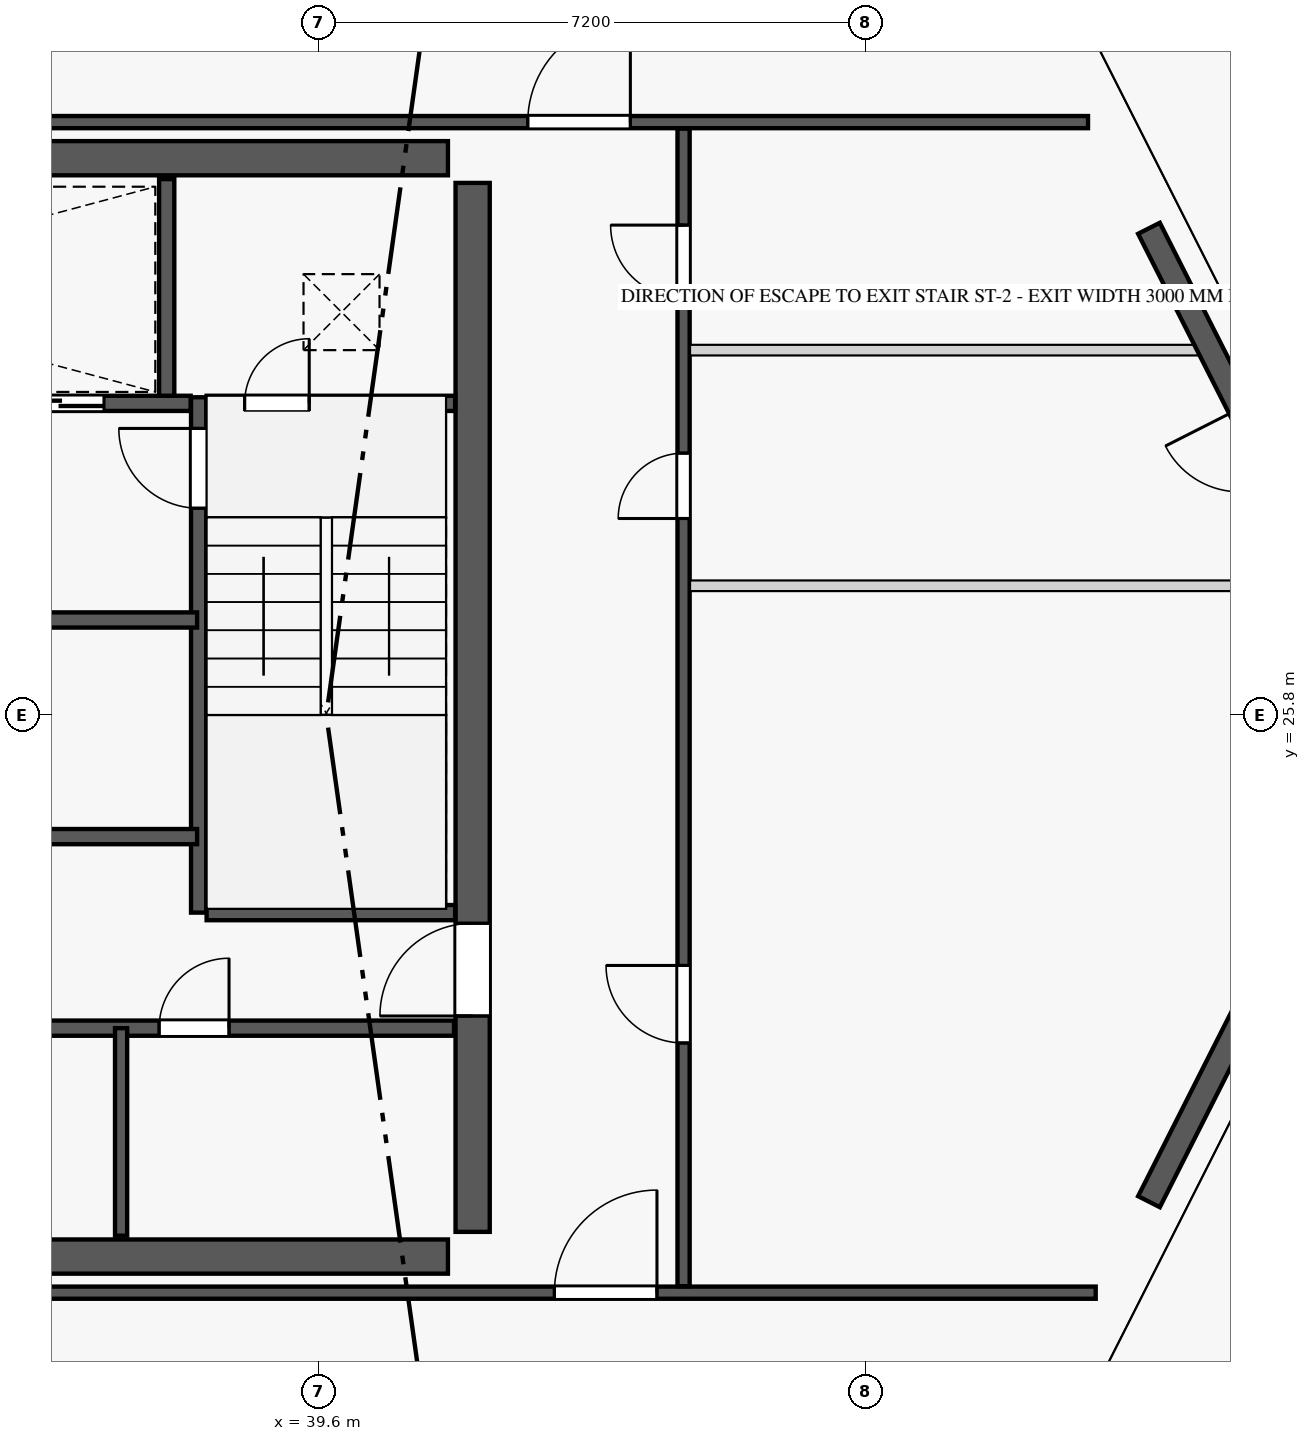
"""IFC4 building model, lengths in metres.
Left out: names, types, materials, properties, quantities, classifications, styles, units other than length and angle.
Written with IfcOpenShell. Run it as: python <this file> out.ifc"""

import sys

from ifc_helpers import new_model, si_unit, direction, frame, frame_2d, origin, origin_2d, place, context, subcontext, project, spatial, rectangle, extrude, element, fill, save


model = new_model("IFC4")
c1 = context("Model", 3, precision=1e-05, world=origin(), true_north=direction((0.0, 1.0)))
c2 = subcontext(c1, "Body", "Model", "MODEL_VIEW")
j1 = project(units=[si_unit("LENGTHUNIT", "METRE"), si_unit("PLANEANGLEUNIT", "RADIAN")], contexts=[c1])
p1 = place(None, origin())
s1 = spatial("IfcSite", under=j1, at=p1, CompositionType="ELEMENT")
p2 = place(p1, origin())
s2 = spatial("IfcBuilding", under=s1, at=p2, CompositionType="ELEMENT")
p3 = place(p2, frame((0.0, 0.0, 278.1)))
s3 = spatial("IfcBuildingStorey", under=s2, at=p3, CompositionType="ELEMENT", Elevation=278.1)
for number, where, z_axis, x_axis in (
    (1, (41.625, 18.675, 0.0), (0.0, 0.0, 1.0), (1.0, 0.0, 0.0)),
    (2, (41.625, 33.125, 0.0), (0.0, 0.0, 1.0), (1.0, 0.0, 0.0)),
):
    element("IfcColumn", number, at=place(p3, frame(where, z_axis=z_axis, x_axis=x_axis)), inside=s3, PredefinedType="COLUMN", context=c2, shape_type="SweptSolid", body=[
        extrude(rectangle(XDim=0.65, YDim=0.65, at=origin_2d()), origin(), (0.0, 0.0, 1.0), 5.4),
    ])
for number, where, z_axis, x_axis in (
    (3, (23.5, 18.675, 0.0), (0.0, 0.0, 1.0), (1.0, 0.0, 0.0)),
    (4, (23.5, 33.125, 0.0), (0.0, 0.0, 1.0), (1.0, 0.0, 0.0)),
):
    element("IfcWall", number, at=place(p3, frame(where, z_axis=z_axis, x_axis=x_axis)), inside=s3, PredefinedType="SHEAR", context=c2, shape_type="SweptSolid", body=[
        extrude(rectangle(XDim=17.8, YDim=0.45, at=frame_2d((8.9, 0.0))), origin(), (0.0, 0.0, 1.0), 5.2),
    ])
p4 = place(p3, frame((41.625, 19.0, 0.0), z_axis=(0.0, 0.0, 1.0), x_axis=(0.0, 1.0, 0.0)))
e5 = element("IfcWall", 5, at=p4, inside=s3, PredefinedType="SHEAR", context=c2, shape_type="SweptSolid", body=[
    extrude(rectangle(XDim=13.8, YDim=0.45, at=frame_2d((6.9, 0.0))), origin(), (0.0, 0.0, 1.0), 5.2),
])
p5 = place(p4, frame((2.84, 0.0, 0.0)))
e6 = element("IfcOpeningElement", 6, at=p5, cuts=e5, PredefinedType="OPENING", context=c2, shape_type="SweptSolid", body=[
    extrude(rectangle(XDim=1.22, YDim=2.25, at=frame_2d((0.61, 1.125))), frame((0.0, 0.235, 0.0), z_axis=(0.0, -1.0, 0.0), x_axis=(1.0, 0.0, 0.0)), (0.0, 0.0, 1.0), 0.47),
])
for number, where, z_axis, x_axis in (
    (7, (50.264, 19.033, 0.0), (0.0, 0.0, 1.0), (1.0, 0.0, 0.0)),
    (8, (50.264, 32.567, 0.0), (0.0, 0.0, 1.0), (1.0, 0.0, 0.0)),
):
    element("IfcColumn", number, at=place(p3, frame(where, z_axis=z_axis, x_axis=x_axis)), inside=s3, PredefinedType="COLUMN", context=c2, shape_type="SweptSolid", body=[
        extrude(rectangle(XDim=0.65, YDim=0.65, at=origin_2d()), origin(), (0.0, 0.0, 1.0), 5.4),
    ])
p6 = place(p3, frame((38.02, 23.2, 0.0), z_axis=(0.0, 0.0, 1.0), x_axis=(0.0, 1.0, 0.0)))
e9 = element("IfcWall", 9, at=p6, inside=s3, PredefinedType="SHEAR", context=c2, shape_type="SweptSolid", body=[
    extrude(rectangle(XDim=6.78, YDim=0.2, at=frame_2d((3.39, 0.0))), origin(), (0.0, 0.0, 1.0), 5.4),
])
p7 = place(p6, frame((5.32, 0.0, 0.0)))
e10 = element("IfcOpeningElement", 10, at=p7, cuts=e9, PredefinedType="OPENING", context=c2, shape_type="SweptSolid", body=[
    extrude(rectangle(XDim=1.05, YDim=2.15, at=frame_2d((0.525, 1.075))), frame((0.0, 0.11, 0.0), z_axis=(0.0, -1.0, 0.0), x_axis=(1.0, 0.0, 0.0)), (0.0, 0.0, 1.0), 0.22),
])
p8 = place(p3, frame((38.125, 23.2, 0.0), z_axis=(0.0, 0.0, 1.0), x_axis=(1.0, 0.0, 0.0)))
e11 = element("IfcWall", 11, at=p8, inside=s3, PredefinedType="PLUMBINGWALL", context=c2, shape_type="SweptSolid", body=[
    extrude(rectangle(XDim=3.27, YDim=0.2, at=frame_2d((1.635, 0.0))), origin(), (0.0, 0.0, 1.0), 5.2),
])
p9 = place(p3, frame((34.9, 29.9, 0.0), z_axis=(0.0, 0.0, 1.0), x_axis=(1.0, 0.0, 0.0)))
e12 = element("IfcWall", 12, at=p9, inside=s3, PredefinedType="PLUMBINGWALL", context=c2, shape_type="SweptSolid", body=[
    extrude(rectangle(XDim=3.015, YDim=0.2, at=frame_2d((1.508, 0.0))), origin(), (0.0, 0.0, 1.0), 5.2),
])
p10 = place(p9, frame((0.725, 0.0, 0.0)))
e13 = element("IfcOpeningElement", 13, at=p10, cuts=e12, PredefinedType="OPENING", context=c2, shape_type="SweptSolid", body=[
    extrude(rectangle(XDim=1.15, YDim=2.2, at=frame_2d((0.575, 1.1))), frame((0.0, 0.11, 0.0), z_axis=(0.0, -1.0, 0.0), x_axis=(1.0, 0.0, 0.0)), (0.0, 0.0, 1.0), 0.22),
])
p11 = place(p3, frame((38.125, 29.9, 0.0), z_axis=(0.0, 0.0, 1.0), x_axis=(1.0, 0.0, 0.0)))
e14 = element("IfcWall", 14, at=p11, inside=s3, PredefinedType="PLUMBINGWALL", context=c2, shape_type="SweptSolid", body=[
    extrude(rectangle(XDim=3.27, YDim=0.2, at=frame_2d((1.635, 0.0))), origin(), (0.0, 0.0, 1.0), 5.2),
])
p12 = place(p11, frame((0.5, 0.0, 0.0)))
e15 = element("IfcOpeningElement", 15, at=p12, cuts=e14, PredefinedType="OPENING", context=c2, shape_type="SweptSolid", body=[
    extrude(rectangle(XDim=0.85, YDim=2.05, at=frame_2d((0.425, 1.025))), frame((0.0, 0.11, 0.0), z_axis=(0.0, -1.0, 0.0), x_axis=(1.0, 0.0, 0.0)), (0.0, 0.0, 1.0), 0.22),
])
p13 = place(p3, frame((37.6, 30.0, 0.0), z_axis=(0.0, 0.0, 1.0), x_axis=(0.0, 1.0, 0.0)))
e16 = element("IfcWall", 16, at=p13, inside=s3, PredefinedType="PLUMBINGWALL", context=c2, shape_type="SweptSolid", body=[
    extrude(rectangle(XDim=2.85, YDim=0.2, at=frame_2d((1.425, 0.0))), origin(), (0.0, 0.0, 1.0), 5.2),
])
p14 = place(p3, frame((34.8, 27.05, 0.0), z_axis=(0.0, 0.0, 1.0), x_axis=(1.0, 0.0, 0.0)))
e17 = element("IfcWall", 17, at=p14, inside=s3, PredefinedType="PLUMBINGWALL", context=c2, shape_type="SweptSolid", body=[
    extrude(rectangle(XDim=3.2, YDim=0.2, at=frame_2d((1.6, 0.0))), origin(), (0.0, 0.0, 1.0), 5.2),
])
p15 = place(p3, frame((31.2, 24.2, 0.0), z_axis=(0.0, 0.0, 1.0), x_axis=(1.0, 0.0, 0.0)))
e18 = element("IfcWall", 18, at=p15, inside=s3, PredefinedType="PLUMBINGWALL", context=c2, shape_type="SweptSolid", body=[
    extrude(rectangle(XDim=6.8, YDim=0.2, at=frame_2d((3.4, 0.0))), origin(), (0.0, 0.0, 1.0), 5.2),
])
p16 = place(p15, frame((0.65, 0.0, 0.0)))
e19 = element("IfcOpeningElement", 19, at=p16, cuts=e18, PredefinedType="OPENING", context=c2, shape_type="SweptSolid", body=[
    extrude(rectangle(XDim=1.1, YDim=2.2, at=frame_2d((0.55, 1.1))), frame((0.0, 0.11, 0.0), z_axis=(0.0, -1.0, 0.0), x_axis=(1.0, 0.0, 0.0)), (0.0, 0.0, 1.0), 0.22),
])
p17 = place(p15, frame((3.8, 0.0, 0.0)))
e20 = element("IfcOpeningElement", 20, at=p17, cuts=e18, PredefinedType="OPENING", context=c2, shape_type="SweptSolid", body=[
    extrude(rectangle(XDim=0.92, YDim=2.15, at=frame_2d((0.46, 1.075))), frame((0.0, 0.11, 0.0), z_axis=(0.0, -1.0, 0.0), x_axis=(1.0, 0.0, 0.0)), (0.0, 0.0, 1.0), 0.22),
])
p18 = place(p3, frame((23.42, 21.68, 0.0), z_axis=(0.0, 0.0, 1.0), x_axis=(1.0, 0.0, 0.0)))
e21 = element("IfcWall", 21, at=p18, inside=s3, PredefinedType="PLUMBINGWALL", context=c2, shape_type="SweptSolid", body=[
    extrude(rectangle(XDim=17.96, YDim=0.2, at=frame_2d((8.98, 0.0))), origin(), (0.0, 0.0, 1.0), 5.2),
])
p19 = place(p18, frame((0.46, 0.0, 0.0)))
e22 = element("IfcOpeningElement", 22, at=p19, cuts=e21, PredefinedType="OPENING", context=c2, shape_type="SweptSolid", body=[
    extrude(rectangle(XDim=0.92, YDim=2.15, at=frame_2d((0.46, 1.075))), frame((0.0, 0.11, 0.0), z_axis=(0.0, -1.0, 0.0), x_axis=(1.0, 0.0, 0.0)), (0.0, 0.0, 1.0), 0.22),
])
p20 = place(p18, frame((4.78, 0.0, 0.0)))
e23 = element("IfcOpeningElement", 23, at=p20, cuts=e21, PredefinedType="OPENING", context=c2, shape_type="SweptSolid", body=[
    extrude(rectangle(XDim=0.92, YDim=2.15, at=frame_2d((0.46, 1.075))), frame((0.0, 0.11, 0.0), z_axis=(0.0, -1.0, 0.0), x_axis=(1.0, 0.0, 0.0)), (0.0, 0.0, 1.0), 0.22),
])
p21 = place(p18, frame((9.48, 0.0, 0.0)))
e24 = element("IfcOpeningElement", 24, at=p21, cuts=e21, PredefinedType="OPENING", context=c2, shape_type="SweptSolid", body=[
    extrude(rectangle(XDim=0.92, YDim=2.15, at=frame_2d((0.46, 1.075))), frame((0.0, 0.11, 0.0), z_axis=(0.0, -1.0, 0.0), x_axis=(1.0, 0.0, 0.0)), (0.0, 0.0, 1.0), 0.22),
])
p22 = place(p18, frame((14.08, 0.0, 0.0)))
e25 = element("IfcOpeningElement", 25, at=p22, cuts=e21, PredefinedType="OPENING", context=c2, shape_type="SweptSolid", body=[
    extrude(rectangle(XDim=0.92, YDim=2.15, at=frame_2d((0.46, 1.075))), frame((0.0, 0.11, 0.0), z_axis=(0.0, -1.0, 0.0), x_axis=(1.0, 0.0, 0.0)), (0.0, 0.0, 1.0), 0.22),
])
p23 = place(p3, frame((37.0, 18.95, 0.0), z_axis=(0.0, 0.0, 1.0), x_axis=(0.0, 1.0, 0.0)))
e26 = element("IfcWall", 26, at=p23, inside=s3, PredefinedType="PARTITIONING", context=c2, shape_type="SweptSolid", body=[
    extrude(rectangle(XDim=2.73, YDim=0.16, at=frame_2d((1.365, 0.0))), origin(), (0.0, 0.0, 1.0), 5.2),
])
p24 = place(p3, frame((14.978, 18.2, 0.0), z_axis=(0.0, 0.0, 1.0), x_axis=(1.0, 0.0, 0.0)))
e27 = element("IfcWall", 27, at=p24, inside=s3, PredefinedType="PARTITIONING", context=c2, shape_type="SweptSolid", body=[
    extrude(rectangle(XDim=34.844, YDim=0.16, at=frame_2d((17.422, 0.0))), origin(), (0.0, 0.0, 1.0), 5.2),
])
p25 = place(p24, frame((5.972, 0.0, 0.0)))
e28 = element("IfcOpeningElement", 28, at=p25, cuts=e27, PredefinedType="OPENING", context=c2, shape_type="SweptSolid", body=[
    extrude(rectangle(XDim=1.35, YDim=2.35, at=frame_2d((0.675, 1.175))), frame((0.0, 0.09, 0.0), z_axis=(0.0, -1.0, 0.0), x_axis=(1.0, 0.0, 0.0)), (0.0, 0.0, 1.0), 0.18),
])
p26 = place(p24, frame((27.722, 0.0, 0.0)))
e29 = element("IfcOpeningElement", 29, at=p26, cuts=e27, PredefinedType="OPENING", context=c2, shape_type="SweptSolid", body=[
    extrude(rectangle(XDim=1.35, YDim=2.35, at=frame_2d((0.675, 1.175))), frame((0.0, 0.09, 0.0), z_axis=(0.0, -1.0, 0.0), x_axis=(1.0, 0.0, 0.0)), (0.0, 0.0, 1.0), 0.18),
])
p27 = place(p3, frame((44.4, 18.285, 0.0), z_axis=(0.0, 0.0, 1.0), x_axis=(0.0, 1.0, 0.0)))
e30 = element("IfcWall", 30, at=p27, inside=s3, PredefinedType="PARTITIONING", context=c2, shape_type="SweptSolid", body=[
    extrude(rectangle(XDim=15.23, YDim=0.16, at=frame_2d((7.615, 0.0))), origin(), (0.0, 0.0, 1.0), 4.887),
])
p28 = place(p27, frame((3.2, 0.0, 0.0)))
e31 = element("IfcOpeningElement", 31, at=p28, cuts=e30, PredefinedType="OPENING", context=c2, shape_type="SweptSolid", body=[
    extrude(rectangle(XDim=1.02, YDim=2.25, at=frame_2d((0.51, 1.125))), frame((0.0, 0.09, 0.0), z_axis=(0.0, -1.0, 0.0), x_axis=(1.0, 0.0, 0.0)), (0.0, 0.0, 1.0), 0.18),
])
p29 = place(p27, frame((10.1, 0.0, 0.0)))
e32 = element("IfcOpeningElement", 32, at=p29, cuts=e30, PredefinedType="OPENING", context=c2, shape_type="SweptSolid", body=[
    extrude(rectangle(XDim=0.86, YDim=2.1, at=frame_2d((0.43, 1.05))), frame((0.0, 0.09, 0.0), z_axis=(0.0, -1.0, 0.0), x_axis=(1.0, 0.0, 0.0)), (0.0, 0.0, 1.0), 0.18),
])
p30 = place(p27, frame((13.0, 0.0, 0.0)))
e33 = element("IfcOpeningElement", 33, at=p30, cuts=e30, PredefinedType="OPENING", context=c2, shape_type="SweptSolid", body=[
    extrude(rectangle(XDim=0.96, YDim=2.15, at=frame_2d((0.48, 1.075))), frame((0.0, 0.09, 0.0), z_axis=(0.0, -1.0, 0.0), x_axis=(1.0, 0.0, 0.0)), (0.0, 0.0, 1.0), 0.18),
])
p31 = place(p3, frame((15.079, 33.6, 0.0), z_axis=(0.0, 0.0, 1.0), x_axis=(1.0, 0.0, 0.0)))
e34 = element("IfcWall", 34, at=p31, inside=s3, PredefinedType="PARTITIONING", context=c2, shape_type="SweptSolid", body=[
    extrude(rectangle(XDim=34.642, YDim=0.16, at=frame_2d((17.321, 0.0))), origin(), (0.0, 0.0, 1.0), 5.2),
])
p32 = place(p31, frame((5.871, 0.0, 0.0)))
e35 = element("IfcOpeningElement", 35, at=p32, cuts=e34, PredefinedType="OPENING", context=c2, shape_type="SweptSolid", body=[
    extrude(rectangle(XDim=1.35, YDim=2.35, at=frame_2d((0.675, 1.175))), frame((0.0, 0.09, 0.0), z_axis=(0.0, -1.0, 0.0), x_axis=(1.0, 0.0, 0.0)), (0.0, 0.0, 1.0), 0.18),
])
p33 = place(p31, frame((27.271, 0.0, 0.0)))
e36 = element("IfcOpeningElement", 36, at=p33, cuts=e34, PredefinedType="OPENING", context=c2, shape_type="SweptSolid", body=[
    extrude(rectangle(XDim=1.35, YDim=2.35, at=frame_2d((0.675, 1.175))), frame((0.0, 0.09, 0.0), z_axis=(0.0, -1.0, 0.0), x_axis=(1.0, 0.0, 0.0)), (0.0, 0.0, 1.0), 0.18),
])
p34 = place(p3, frame((44.485, 27.5, 0.0), z_axis=(0.0, 0.0, 1.0), x_axis=(1.0, 0.0, 0.0)))
e37 = element("IfcWall", 37, at=p34, inside=s3, PredefinedType="PLUMBINGWALL", context=c2, shape_type="SweptSolid", body=[
    extrude(rectangle(XDim=8.322, YDim=0.14, at=frame_2d((4.161, 0.0))), origin(), (0.0, 0.0, 1.0), 5.2),
])
p35 = place(p3, frame((44.485, 30.6, 0.0), z_axis=(0.0, 0.0, 1.0), x_axis=(1.0, 0.0, 0.0)))
e38 = element("IfcWall", 38, at=p35, inside=s3, PredefinedType="PLUMBINGWALL", context=c2, shape_type="SweptSolid", body=[
    extrude(rectangle(XDim=6.754, YDim=0.14, at=frame_2d((3.377, 0.0))), origin(), (0.0, 0.0, 1.0), 5.2),
])
p36 = place(p3, frame((50.523, 19.397, 0.0), z_axis=(0.0, 0.0, 1.0), x_axis=(0.451535871335, 0.892252966875, 0.0)))
e39 = element("IfcWall", 39, at=p36, inside=s3, PredefinedType="STANDARD", context=c2, shape_type="SweptSolid", body=[
    extrude(rectangle(XDim=4.536, YDim=0.32, at=frame_2d((2.268, 0.0))), origin(), (0.0, 0.0, 1.0), 4.39),
])
p37 = place(p36, frame((1.568, 0.0, 0.75)))
e40 = element("IfcOpeningElement", 40, at=p37, cuts=e39, PredefinedType="OPENING", context=c2, shape_type="SweptSolid", body=[
    extrude(rectangle(XDim=1.4, YDim=2.05, at=frame_2d((0.7, 1.025))), frame((0.0, 0.17, 0.0), z_axis=(0.0, -1.0, 0.0), x_axis=(1.0, 0.0, 0.0)), (0.0, 0.0, 1.0), 0.34),
])
p38 = place(p3, frame((52.571, 28.156, 0.0), z_axis=(0.0, 0.0, 1.0), x_axis=(-0.451557557387, 0.892241992044, 0.0)))
e41 = element("IfcWall", 41, at=p38, inside=s3, PredefinedType="STANDARD", context=c2, shape_type="SweptSolid", body=[
    extrude(rectangle(XDim=4.536, YDim=0.32, at=frame_2d((2.268, 0.0))), origin(), (0.0, 0.0, 1.0), 4.39),
])
p39 = place(p38, frame((0.782, 0.0, 0.0)))
e42 = element("IfcOpeningElement", 42, at=p39, cuts=e41, PredefinedType="OPENING", context=c2, shape_type="SweptSolid", body=[
    extrude(rectangle(XDim=1.1, YDim=2.25, at=frame_2d((0.55, 1.125))), frame((0.0, 0.17, 0.0), z_axis=(0.0, -1.0, 0.0), x_axis=(1.0, 0.0, 0.0)), (0.0, 0.0, 1.0), 0.34),
])
p40 = place(p38, frame((3.173, 0.0, 0.75)))
e43 = element("IfcOpeningElement", 43, at=p40, cuts=e41, PredefinedType="OPENING", context=c2, shape_type="SweptSolid", body=[
    extrude(rectangle(XDim=1.1, YDim=2.0, at=frame_2d((0.55, 1.0))), frame((0.0, 0.17, 0.0), z_axis=(0.0, -1.0, 0.0), x_axis=(1.0, 0.0, 0.0)), (0.0, 0.0, 1.0), 0.34),
])
p41 = place(p5, origin())
e44 = element("IfcDoor", 44, at=p41, inside=s3, OperationType="SINGLE_SWING_LEFT", PredefinedType="DOOR", context=c2, shape_type="SweptSolid", body=[
    extrude(rectangle(XDim=1.22, YDim=2.25, at=frame_2d((0.61, 1.125))), frame((0.0, 0.025, 0.0), z_axis=(0.0, -1.0, 0.0), x_axis=(1.0, 0.0, 0.0)), (0.0, 0.0, 1.0), 0.05),
])
fill(e6, e44)
p42 = place(p7, origin())
e45 = element("IfcDoor", 45, at=p42, inside=s3, OperationType="SINGLE_SWING_RIGHT", PredefinedType="DOOR", context=c2, shape_type="SweptSolid", body=[
    extrude(rectangle(XDim=1.05, YDim=2.15, at=frame_2d((0.525, 1.075))), frame((0.0, 0.025, 0.0), z_axis=(0.0, -1.0, 0.0), x_axis=(1.0, 0.0, 0.0)), (0.0, 0.0, 1.0), 0.05),
])
fill(e10, e45)
p43 = place(p12, origin())
e46 = element("IfcDoor", 46, at=p43, inside=s3, OperationType="SINGLE_SWING_RIGHT", PredefinedType="DOOR", context=c2, shape_type="SweptSolid", body=[
    extrude(rectangle(XDim=0.85, YDim=2.05, at=frame_2d((0.425, 1.025))), frame((0.0, 0.025, 0.0), z_axis=(0.0, -1.0, 0.0), x_axis=(1.0, 0.0, 0.0)), (0.0, 0.0, 1.0), 0.05),
])
fill(e15, e46)
p44 = place(p10, origin())
e47 = element("IfcDoor", 47, at=p44, inside=s3, OperationType="DOUBLE_DOOR_SLIDING", PredefinedType="DOOR", context=c2, shape_type="SweptSolid", body=[
    extrude(rectangle(XDim=1.15, YDim=2.2, at=frame_2d((0.575, 1.1))), frame((0.0, 0.025, 0.0), z_axis=(0.0, -1.0, 0.0), x_axis=(1.0, 0.0, 0.0)), (0.0, 0.0, 1.0), 0.05),
])
fill(e13, e47)
p45 = place(p22, origin())
e48 = element("IfcDoor", 48, at=p45, inside=s3, OperationType="SINGLE_SWING_RIGHT", PredefinedType="DOOR", context=c2, shape_type="SweptSolid", body=[
    extrude(rectangle(XDim=0.92, YDim=2.15, at=frame_2d((0.46, 1.075))), frame((0.0, 0.025, 0.0), z_axis=(0.0, -1.0, 0.0), x_axis=(1.0, 0.0, 0.0)), (0.0, 0.0, 1.0), 0.05),
])
fill(e25, e48)
p46 = place(p26, origin())
e49 = element("IfcDoor", 49, at=p46, inside=s3, OperationType="SINGLE_SWING_RIGHT", PredefinedType="DOOR", context=c2, shape_type="SweptSolid", body=[
    extrude(rectangle(XDim=1.35, YDim=2.35, at=frame_2d((0.675, 1.175))), frame((0.0, 0.025, 0.0), z_axis=(0.0, -1.0, 0.0), x_axis=(1.0, 0.0, 0.0)), (0.0, 0.0, 1.0), 0.05),
])
fill(e29, e49)
p47 = place(p28, origin())
e50 = element("IfcDoor", 50, at=p47, inside=s3, OperationType="SINGLE_SWING_RIGHT", PredefinedType="DOOR", context=c2, shape_type="SweptSolid", body=[
    extrude(rectangle(XDim=1.02, YDim=2.25, at=frame_2d((0.51, 1.125))), frame((0.0, 0.025, 0.0), z_axis=(0.0, -1.0, 0.0), x_axis=(1.0, 0.0, 0.0)), (0.0, 0.0, 1.0), 0.05),
])
fill(e31, e50)
p48 = place(p29, origin())
e51 = element("IfcDoor", 51, at=p48, inside=s3, OperationType="SINGLE_SWING_LEFT", PredefinedType="DOOR", context=c2, shape_type="SweptSolid", body=[
    extrude(rectangle(XDim=0.86, YDim=2.1, at=frame_2d((0.43, 1.05))), frame((0.0, 0.025, 0.0), z_axis=(0.0, -1.0, 0.0), x_axis=(1.0, 0.0, 0.0)), (0.0, 0.0, 1.0), 0.05),
])
fill(e32, e51)
p49 = place(p30, origin())
e52 = element("IfcDoor", 52, at=p49, inside=s3, OperationType="SINGLE_SWING_RIGHT", PredefinedType="DOOR", context=c2, shape_type="SweptSolid", body=[
    extrude(rectangle(XDim=0.96, YDim=2.15, at=frame_2d((0.48, 1.075))), frame((0.0, 0.025, 0.0), z_axis=(0.0, -1.0, 0.0), x_axis=(1.0, 0.0, 0.0)), (0.0, 0.0, 1.0), 0.05),
])
fill(e33, e52)
p50 = place(p33, origin())
e53 = element("IfcDoor", 53, at=p50, inside=s3, OperationType="SINGLE_SWING_RIGHT", PredefinedType="DOOR", context=c2, shape_type="SweptSolid", body=[
    extrude(rectangle(XDim=1.35, YDim=2.35, at=frame_2d((0.675, 1.175))), frame((0.0, 0.025, 0.0), z_axis=(0.0, -1.0, 0.0), x_axis=(1.0, 0.0, 0.0)), (0.0, 0.0, 1.0), 0.05),
])
fill(e36, e53)
p51 = place(p37, origin())
e54 = element("IfcWindow", 54, at=p51, inside=s3, PartitioningType="SINGLE_PANEL", PredefinedType="WINDOW", context=c2, shape_type="SweptSolid", body=[
    extrude(rectangle(XDim=1.4, YDim=2.05, at=frame_2d((0.7, 1.025))), frame((0.0, 0.03, 0.0), z_axis=(0.0, -1.0, 0.0), x_axis=(1.0, 0.0, 0.0)), (0.0, 0.0, 1.0), 0.06),
])
fill(e40, e54)
p52 = place(p40, origin())
e55 = element("IfcWindow", 55, at=p52, inside=s3, PartitioningType="SINGLE_PANEL", PredefinedType="WINDOW", context=c2, shape_type="SweptSolid", body=[
    extrude(rectangle(XDim=1.1, YDim=2.0, at=frame_2d((0.55, 1.0))), frame((0.0, 0.03, 0.0), z_axis=(0.0, -1.0, 0.0), x_axis=(1.0, 0.0, 0.0)), (0.0, 0.0, 1.0), 0.06),
])
fill(e43, e55)
save(model, sys.argv[1])
